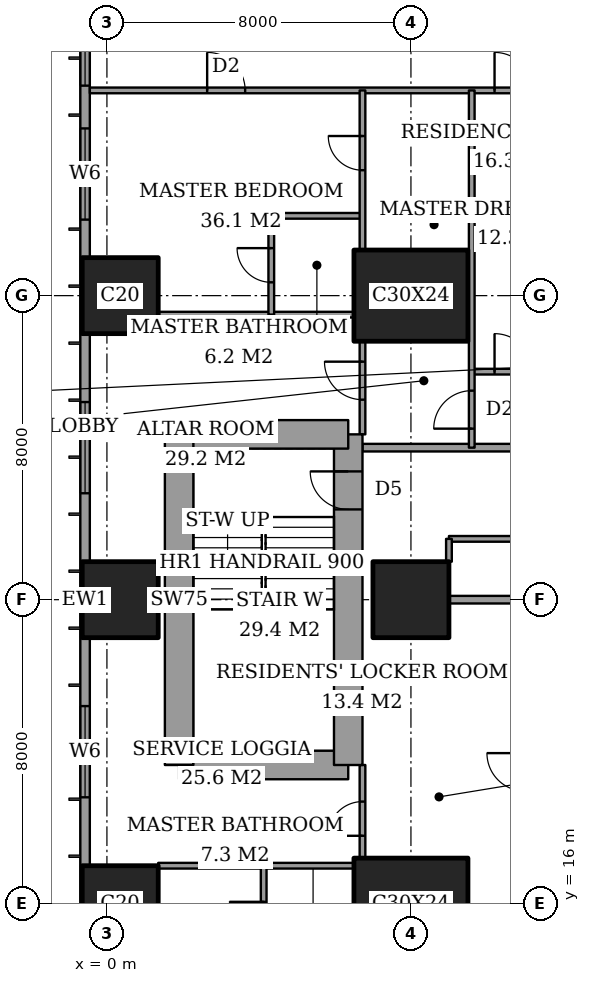
"""IFC4 building model, lengths in metres.
Left out: names, types, materials, properties, quantities, classifications, styles, units other than length and angle.
Written with IfcOpenShell. Run it as: python <this file> out.ifc"""

import sys

from ifc_helpers import new_model, si_unit, direction, frame, frame_2d, origin, origin_2d, place, context, subcontext, project, spatial, rectangle, extrude, element, fill, save


model = new_model("IFC4")
c1 = context("Model", 3, precision=1e-05, world=origin(), true_north=direction((0.0, 1.0)))
c2 = subcontext(c1, "Body", "Model", "MODEL_VIEW")
j1 = project(units=[si_unit("LENGTHUNIT", "METRE"), si_unit("PLANEANGLEUNIT", "RADIAN")], contexts=[c1])
p1 = place(None, origin())
s1 = spatial("IfcSite", under=j1, at=p1, CompositionType="ELEMENT")
p2 = place(p1, origin())
s2 = spatial("IfcBuilding", under=s1, at=p2, CompositionType="ELEMENT")
p3 = place(p2, frame((0.0, 0.0, 72.8)))
s3 = spatial("IfcBuildingStorey", under=s2, at=p3, CompositionType="ELEMENT", Elevation=72.8)
for number, where, z_axis, x_axis in (
    (1, (0.35, 16.0, 0.0), (0.0, 0.0, 1.0), (1.0, 0.0, 0.0)),
    (2, (0.35, 24.0, 0.0), (0.0, 0.0, 1.0), (1.0, 0.0, 0.0)),
    (3, (0.35, 32.0, 0.0), (0.0, 0.0, 1.0), (1.0, 0.0, 0.0)),
):
    element("IfcColumn", number, at=place(p3, frame(where, z_axis=z_axis, x_axis=x_axis)), inside=s3, PredefinedType="COLUMN", context=c2, shape_type="SweptSolid", body=[
        extrude(rectangle(XDim=2.0, YDim=2.0, at=origin_2d()), origin(), (0.0, 0.0, 1.0), 3.6),
    ])
p4 = place(p3, frame((8.0, 16.0, 0.0), z_axis=(0.0, 0.0, 1.0), x_axis=(1.0, 0.0, 0.0)))
e4 = element("IfcColumn", 4, at=p4, inside=s3, PredefinedType="COLUMN", context=c2, shape_type="SweptSolid", body=[
    extrude(rectangle(XDim=3.0, YDim=2.4, at=origin_2d()), origin(), (0.0, 0.0, 1.0), 3.6),
])
p5 = place(p3, frame((8.0, 24.0, 0.0), z_axis=(0.0, 0.0, 1.0), x_axis=(1.0, 0.0, 0.0)))
e5 = element("IfcColumn", 5, at=p5, inside=s3, PredefinedType="COLUMN", context=c2, shape_type="SweptSolid", body=[
    extrude(rectangle(XDim=2.0, YDim=2.0, at=origin_2d()), origin(), (0.0, 0.0, 1.0), 3.6),
])
p6 = place(p3, frame((8.0, 32.0, 0.0), z_axis=(0.0, 0.0, 1.0), x_axis=(1.0, 0.0, 0.0)))
e6 = element("IfcColumn", 6, at=p6, inside=s3, PredefinedType="COLUMN", context=c2, shape_type="SweptSolid", body=[
    extrude(rectangle(XDim=3.0, YDim=2.4, at=origin_2d()), origin(), (0.0, 0.0, 1.0), 3.6),
])
p7 = place(p3, frame((1.9, 19.65, 0.0), z_axis=(0.0, 0.0, 1.0), x_axis=(1.0, 0.0, 0.0)))
e7 = element("IfcWall", 7, at=p7, inside=s3, PredefinedType="SHEAR", context=c2, shape_type="SweptSolid", body=[
    extrude(rectangle(XDim=4.45, YDim=0.75, at=frame_2d((2.225, 0.0))), origin(), (0.0, 0.0, 1.0), 3.6),
])
p8 = place(p3, frame((6.35, 19.65, 0.0), z_axis=(0.0, 0.0, 1.0), x_axis=(0.0, 1.0, 0.0)))
e8 = element("IfcWall", 8, at=p8, inside=s3, PredefinedType="SHEAR", context=c2, shape_type="SweptSolid", body=[
    extrude(rectangle(XDim=8.7, YDim=0.75, at=frame_2d((4.35, 0.0))), origin(), (0.0, 0.0, 1.0), 3.6),
])
p9 = place(p8, frame((6.725, 0.0, 0.0)))
e9 = element("IfcOpeningElement", 9, at=p9, cuts=e8, PredefinedType="OPENING", context=c2, shape_type="SweptSolid", body=[
    extrude(rectangle(XDim=1.0, YDim=2.1, at=frame_2d((0.5, 1.05))), frame((0.0, 0.385, 0.0), z_axis=(0.0, -1.0, 0.0), x_axis=(1.0, 0.0, 0.0)), (0.0, 0.0, 1.0), 0.77),
])
p10 = place(p3, frame((6.35, 28.35, 0.0), z_axis=(0.0, 0.0, 1.0), x_axis=(-1.0, 0.0, 0.0)))
e10 = element("IfcWall", 10, at=p10, inside=s3, PredefinedType="SHEAR", context=c2, shape_type="SweptSolid", body=[
    extrude(rectangle(XDim=4.45, YDim=0.75, at=frame_2d((2.225, 0.0))), origin(), (0.0, 0.0, 1.0), 3.6),
])
p11 = place(p3, frame((1.9, 28.35, 0.0), z_axis=(0.0, 0.0, 1.0), x_axis=(0.0, -1.0, 0.0)))
e11 = element("IfcWall", 11, at=p11, inside=s3, PredefinedType="SHEAR", context=c2, shape_type="SweptSolid", body=[
    extrude(rectangle(XDim=8.7, YDim=0.75, at=frame_2d((4.35, 0.0))), origin(), (0.0, 0.0, 1.0), 3.6),
])
p12 = place(p3, frame((-0.575, 44.825, 0.0), z_axis=(0.0, 0.0, 1.0), x_axis=(0.0, -1.0, 0.0)))
e12 = element("IfcWall", 12, at=p12, inside=s3, PredefinedType="SOLIDWALL", context=c2, shape_type="SweptSolid", body=[
    extrude(rectangle(XDim=41.65, YDim=0.25, at=frame_2d((20.825, 0.0))), origin(), (0.0, 0.0, 1.0), 3.6),
])
p13 = place(p12, frame((0.775, 0.0, 0.6)))
e13 = element("IfcOpeningElement", 13, at=p13, cuts=e12, PredefinedType="OPENING", context=c2, shape_type="SweptSolid", body=[
    extrude(rectangle(XDim=2.4, YDim=2.0, at=frame_2d((1.2, 1.0))), frame((0.0, 0.135, 0.0), z_axis=(0.0, -1.0, 0.0), x_axis=(1.0, 0.0, 0.0)), (0.0, 0.0, 1.0), 0.27),
])
p14 = place(p12, frame((6.1, 0.0, 0.6)))
e14 = element("IfcOpeningElement", 14, at=p14, cuts=e12, PredefinedType="OPENING", context=c2, shape_type="SweptSolid", body=[
    extrude(rectangle(XDim=1.2, YDim=2.0, at=frame_2d((0.6, 1.0))), frame((0.0, 0.135, 0.0), z_axis=(0.0, -1.0, 0.0), x_axis=(1.0, 0.0, 0.0)), (0.0, 0.0, 1.0), 0.27),
])
p15 = place(p12, frame((8.425, 0.0, 0.6)))
e15 = element("IfcOpeningElement", 15, at=p15, cuts=e12, PredefinedType="OPENING", context=c2, shape_type="SweptSolid", body=[
    extrude(rectangle(XDim=2.4, YDim=2.0, at=frame_2d((1.2, 1.0))), frame((0.0, 0.135, 0.0), z_axis=(0.0, -1.0, 0.0), x_axis=(1.0, 0.0, 0.0)), (0.0, 0.0, 1.0), 0.27),
])
p16 = place(p12, frame((15.625, 0.0, 0.6)))
e16 = element("IfcOpeningElement", 16, at=p16, cuts=e12, PredefinedType="OPENING", context=c2, shape_type="SweptSolid", body=[
    extrude(rectangle(XDim=2.4, YDim=2.0, at=frame_2d((1.2, 1.0))), frame((0.0, 0.135, 0.0), z_axis=(0.0, -1.0, 0.0), x_axis=(1.0, 0.0, 0.0)), (0.0, 0.0, 1.0), 0.27),
])
p17 = place(p12, frame((23.625, 0.0, 0.6)))
e17 = element("IfcOpeningElement", 17, at=p17, cuts=e12, PredefinedType="OPENING", context=c2, shape_type="SweptSolid", body=[
    extrude(rectangle(XDim=2.4, YDim=2.0, at=frame_2d((1.2, 1.0))), frame((0.0, 0.135, 0.0), z_axis=(0.0, -1.0, 0.0), x_axis=(1.0, 0.0, 0.0)), (0.0, 0.0, 1.0), 0.27),
])
p18 = place(p12, frame((30.625, 0.0, 0.6)))
e18 = element("IfcOpeningElement", 18, at=p18, cuts=e12, PredefinedType="OPENING", context=c2, shape_type="SweptSolid", body=[
    extrude(rectangle(XDim=2.4, YDim=2.0, at=frame_2d((1.2, 1.0))), frame((0.0, 0.135, 0.0), z_axis=(0.0, -1.0, 0.0), x_axis=(1.0, 0.0, 0.0)), (0.0, 0.0, 1.0), 0.27),
])
p19 = place(p12, frame((34.225, 0.0, 0.6)))
e19 = element("IfcOpeningElement", 19, at=p19, cuts=e12, PredefinedType="OPENING", context=c2, shape_type="SweptSolid", body=[
    extrude(rectangle(XDim=1.2, YDim=2.0, at=frame_2d((0.6, 1.0))), frame((0.0, 0.135, 0.0), z_axis=(0.0, -1.0, 0.0), x_axis=(1.0, 0.0, 0.0)), (0.0, 0.0, 1.0), 0.27),
])
p20 = place(p12, frame((38.475, 0.0, 0.6)))
e20 = element("IfcOpeningElement", 20, at=p20, cuts=e12, PredefinedType="OPENING", context=c2, shape_type="SweptSolid", body=[
    extrude(rectangle(XDim=2.4, YDim=2.0, at=frame_2d((1.2, 1.0))), frame((0.0, 0.135, 0.0), z_axis=(0.0, -1.0, 0.0), x_axis=(1.0, 0.0, 0.0)), (0.0, 0.0, 1.0), 0.27),
])
p21 = place(p3, frame((1.35, 17.0, 0.0), z_axis=(0.0, 0.0, 1.0), x_axis=(1.0, 0.0, 0.0)))
e21 = element("IfcWall", 21, at=p21, inside=s3, PredefinedType="PARTITIONING", context=c2, shape_type="SweptSolid", body=[
    extrude(rectangle(XDim=5.15, YDim=0.15, at=frame_2d((2.575, 0.0))), origin(), (0.0, 0.0, 1.0), 3.35),
])
p22 = place(p3, frame((9.0, 24.0, 0.0), z_axis=(0.0, 0.0, 1.0), x_axis=(1.0, 0.0, 0.0)))
e22 = element("IfcWall", 22, at=p22, inside=s3, PredefinedType="PARTITIONING", context=c2, shape_type="SweptSolid", body=[
    extrude(rectangle(XDim=6.0, YDim=0.2, at=frame_2d((3.0, 0.0))), origin(), (0.0, 0.0, 1.0), 3.35),
])
p23 = place(p3, frame((9.0, 25.6, 0.0), z_axis=(0.0, 0.0, 1.0), x_axis=(1.0, 0.0, 0.0)))
e23 = element("IfcWall", 23, at=p23, inside=s3, PredefinedType="PARTITIONING", context=c2, shape_type="SweptSolid", body=[
    extrude(rectangle(XDim=8.4, YDim=0.15, at=frame_2d((4.2, 0.0))), origin(), (0.0, 0.0, 1.0), 3.35),
])
p24 = place(p23, frame((3.75, 0.0, 0.0)))
e24 = element("IfcOpeningElement", 24, at=p24, cuts=e23, PredefinedType="OPENING", context=c2, shape_type="SweptSolid", body=[
    extrude(rectangle(XDim=0.9, YDim=2.1, at=frame_2d((0.45, 1.05))), frame((0.0, 0.085, 0.0), z_axis=(0.0, -1.0, 0.0), x_axis=(1.0, 0.0, 0.0)), (0.0, 0.0, 1.0), 0.17),
])
p25 = place(p3, frame((6.725, 28.0, 0.0), z_axis=(0.0, 0.0, 1.0), x_axis=(1.0, 0.0, 0.0)))
e25 = element("IfcWall", 25, at=p25, inside=s3, PredefinedType="PARTITIONING", context=c2, shape_type="SweptSolid", body=[
    extrude(rectangle(XDim=17.275, YDim=0.2, at=frame_2d((8.637, 0.0))), origin(), (0.0, 0.0, 1.0), 3.35),
])
p26 = place(p25, frame((6.475, 0.0, 0.0)))
e26 = element("IfcOpeningElement", 26, at=p26, cuts=e25, PredefinedType="OPENING", context=c2, shape_type="SweptSolid", body=[
    extrude(rectangle(XDim=1.2, YDim=2.4, at=frame_2d((0.6, 1.2))), frame((0.0, 0.11, 0.0), z_axis=(0.0, -1.0, 0.0), x_axis=(1.0, 0.0, 0.0)), (0.0, 0.0, 1.0), 0.22),
])
p27 = place(p3, frame((9.6, 30.0, 0.0), z_axis=(0.0, 0.0, 1.0), x_axis=(1.0, 0.0, 0.0)))
e27 = element("IfcWall", 27, at=p27, inside=s3, PredefinedType="PARTITIONING", context=c2, shape_type="SweptSolid", body=[
    extrude(rectangle(XDim=4.8, YDim=0.15, at=frame_2d((2.4, 0.0))), origin(), (0.0, 0.0, 1.0), 3.35),
])
p28 = place(p27, frame((0.6, 0.0, 0.0)))
e28 = element("IfcOpeningElement", 28, at=p28, cuts=e27, PredefinedType="OPENING", context=c2, shape_type="SweptSolid", body=[
    extrude(rectangle(XDim=1.0, YDim=2.1, at=frame_2d((0.5, 1.05))), frame((0.0, 0.085, 0.0), z_axis=(0.0, -1.0, 0.0), x_axis=(1.0, 0.0, 0.0)), (0.0, 0.0, 1.0), 0.17),
])
p29 = place(p3, frame((1.35, 31.5, 0.0), z_axis=(0.0, 0.0, 1.0), x_axis=(1.0, 0.0, 0.0)))
e29 = element("IfcWall", 29, at=p29, inside=s3, PredefinedType="PARTITIONING", context=c2, shape_type="SweptSolid", body=[
    extrude(rectangle(XDim=5.15, YDim=0.15, at=frame_2d((2.575, 0.0))), origin(), (0.0, 0.0, 1.0), 3.35),
])
p30 = place(p3, frame((4.325, 34.1, 0.0), z_axis=(0.0, 0.0, 1.0), x_axis=(1.0, 0.0, 0.0)))
e30 = element("IfcWall", 30, at=p30, inside=s3, PredefinedType="PARTITIONING", context=c2, shape_type="SweptSolid", body=[
    extrude(rectangle(XDim=2.4, YDim=0.15, at=frame_2d((1.2, 0.0))), origin(), (0.0, 0.0, 1.0), 3.35),
])
p31 = place(p3, frame((-0.45, 37.4, 0.0), z_axis=(0.0, 0.0, 1.0), x_axis=(1.0, 0.0, 0.0)))
e31 = element("IfcWall", 31, at=p31, inside=s3, PredefinedType="PARTITIONING", context=c2, shape_type="SweptSolid", body=[
    extrude(rectangle(XDim=25.011, YDim=0.15, at=frame_2d((12.505, 0.0))), origin(), (0.0, 0.0, 1.0), 3.35),
])
p32 = place(p31, frame((10.65, 0.0, 0.0)))
e32 = element("IfcOpeningElement", 32, at=p32, cuts=e31, PredefinedType="OPENING", context=c2, shape_type="SweptSolid", body=[
    extrude(rectangle(XDim=1.0, YDim=2.1, at=frame_2d((0.5, 1.05))), frame((0.0, 0.085, 0.0), z_axis=(0.0, -1.0, 0.0), x_axis=(1.0, 0.0, 0.0)), (0.0, 0.0, 1.0), 0.17),
])
p33 = place(p31, frame((3.087, 0.0, 0.0)))
e33 = element("IfcOpeningElement", 33, at=p33, cuts=e31, PredefinedType="OPENING", context=c2, shape_type="SweptSolid", body=[
    extrude(rectangle(XDim=1.0, YDim=2.1, at=frame_2d((0.5, 1.05))), frame((0.0, 0.085, 0.0), z_axis=(0.0, -1.0, 0.0), x_axis=(1.0, 0.0, 0.0)), (0.0, 0.0, 1.0), 0.17),
])
p34 = place(p31, frame((13.45, 0.0, 0.0)))
e34 = element("IfcOpeningElement", 34, at=p34, cuts=e31, PredefinedType="OPENING", context=c2, shape_type="SweptSolid", body=[
    extrude(rectangle(XDim=1.0, YDim=2.1, at=frame_2d((0.5, 1.05))), frame((0.0, 0.085, 0.0), z_axis=(0.0, -1.0, 0.0), x_axis=(1.0, 0.0, 0.0)), (0.0, 0.0, 1.0), 0.17),
])
p35 = place(p31, frame((16.55, 0.0, 0.0)))
e35 = element("IfcOpeningElement", 35, at=p35, cuts=e31, PredefinedType="OPENING", context=c2, shape_type="SweptSolid", body=[
    extrude(rectangle(XDim=1.0, YDim=2.1, at=frame_2d((0.5, 1.05))), frame((0.0, 0.085, 0.0), z_axis=(0.0, -1.0, 0.0), x_axis=(1.0, 0.0, 0.0)), (0.0, 0.0, 1.0), 0.17),
])
p36 = place(p31, frame((21.175, 0.0, 0.0)))
e36 = element("IfcOpeningElement", 36, at=p36, cuts=e31, PredefinedType="OPENING", context=c2, shape_type="SweptSolid", body=[
    extrude(rectangle(XDim=1.0, YDim=2.1, at=frame_2d((0.5, 1.05))), frame((0.0, 0.085, 0.0), z_axis=(0.0, -1.0, 0.0), x_axis=(1.0, 0.0, 0.0)), (0.0, 0.0, 1.0), 0.17),
])
p37 = place(p3, frame((4.125, 14.2, 0.0), z_axis=(0.0, 0.0, 1.0), x_axis=(0.0, 1.0, 0.0)))
e37 = element("IfcWall", 37, at=p37, inside=s3, PredefinedType="PARTITIONING", context=c2, shape_type="SweptSolid", body=[
    extrude(rectangle(XDim=2.8, YDim=0.15, at=frame_2d((1.4, 0.0))), origin(), (0.0, 0.0, 1.0), 3.35),
])
p38 = place(p37, frame((0.95, 0.0, 0.0)))
e38 = element("IfcOpeningElement", 38, at=p38, cuts=e37, PredefinedType="OPENING", context=c2, shape_type="SweptSolid", body=[
    extrude(rectangle(XDim=0.9, YDim=2.1, at=frame_2d((0.45, 1.05))), frame((0.0, 0.085, 0.0), z_axis=(0.0, -1.0, 0.0), x_axis=(1.0, 0.0, 0.0)), (0.0, 0.0, 1.0), 0.17),
])
p39 = place(p3, frame((4.325, 31.5, 0.0), z_axis=(0.0, 0.0, 1.0), x_axis=(0.0, 1.0, 0.0)))
e39 = element("IfcWall", 39, at=p39, inside=s3, PredefinedType="PARTITIONING", context=c2, shape_type="SweptSolid", body=[
    extrude(rectangle(XDim=2.6, YDim=0.15, at=frame_2d((1.3, 0.0))), origin(), (0.0, 0.0, 1.0), 3.35),
])
p40 = place(p39, frame((0.85, 0.0, 0.0)))
e40 = element("IfcOpeningElement", 40, at=p40, cuts=e39, PredefinedType="OPENING", context=c2, shape_type="SweptSolid", body=[
    extrude(rectangle(XDim=0.9, YDim=2.1, at=frame_2d((0.45, 1.05))), frame((0.0, 0.085, 0.0), z_axis=(0.0, -1.0, 0.0), x_axis=(1.0, 0.0, 0.0)), (0.0, 0.0, 1.0), 0.17),
])
p41 = place(p3, frame((6.725, 17.2, 0.0), z_axis=(0.0, 0.0, 1.0), x_axis=(0.0, 1.0, 0.0)))
e41 = element("IfcWall", 41, at=p41, inside=s3, PredefinedType="PARTITIONING", context=c2, shape_type="SweptSolid", body=[
    extrude(rectangle(XDim=2.45, YDim=0.15, at=frame_2d((1.225, 0.0))), origin(), (0.0, 0.0, 1.0), 3.35),
])
p42 = place(p41, frame((0.587, 0.0, 0.0)))
e42 = element("IfcOpeningElement", 42, at=p42, cuts=e41, PredefinedType="OPENING", context=c2, shape_type="SweptSolid", body=[
    extrude(rectangle(XDim=0.9, YDim=2.1, at=frame_2d((0.45, 1.05))), frame((0.0, 0.085, 0.0), z_axis=(0.0, -1.0, 0.0), x_axis=(1.0, 0.0, 0.0)), (0.0, 0.0, 1.0), 0.17),
])
p43 = place(p3, frame((6.725, 28.35, 0.0), z_axis=(0.0, 0.0, 1.0), x_axis=(0.0, 1.0, 0.0)))
e43 = element("IfcWall", 43, at=p43, inside=s3, PredefinedType="PARTITIONING", context=c2, shape_type="SweptSolid", body=[
    extrude(rectangle(XDim=2.45, YDim=0.15, at=frame_2d((1.225, 0.0))), origin(), (0.0, 0.0, 1.0), 3.35),
])
p44 = place(p43, frame((0.913, 0.0, 0.0)))
e44 = element("IfcOpeningElement", 44, at=p44, cuts=e43, PredefinedType="OPENING", context=c2, shape_type="SweptSolid", body=[
    extrude(rectangle(XDim=1.0, YDim=2.1, at=frame_2d((0.5, 1.05))), frame((0.0, 0.085, 0.0), z_axis=(0.0, -1.0, 0.0), x_axis=(1.0, 0.0, 0.0)), (0.0, 0.0, 1.0), 0.17),
])
p45 = place(p3, frame((6.725, 33.2, 0.0), z_axis=(0.0, 0.0, 1.0), x_axis=(0.0, 1.0, 0.0)))
e45 = element("IfcWall", 45, at=p45, inside=s3, PredefinedType="PARTITIONING", context=c2, shape_type="SweptSolid", body=[
    extrude(rectangle(XDim=4.2, YDim=0.15, at=frame_2d((2.1, 0.0))), origin(), (0.0, 0.0, 1.0), 3.35),
])
p46 = place(p45, frame((2.1, 0.0, 0.0)))
e46 = element("IfcOpeningElement", 46, at=p46, cuts=e45, PredefinedType="OPENING", context=c2, shape_type="SweptSolid", body=[
    extrude(rectangle(XDim=0.9, YDim=2.1, at=frame_2d((0.45, 1.05))), frame((0.0, 0.085, 0.0), z_axis=(0.0, -1.0, 0.0), x_axis=(1.0, 0.0, 0.0)), (0.0, 0.0, 1.0), 0.17),
])
p47 = place(p3, frame((9.0, 25.0, 0.0), z_axis=(0.0, 0.0, 1.0), x_axis=(0.0, 1.0, 0.0)))
e47 = element("IfcWall", 47, at=p47, inside=s3, PredefinedType="PARTITIONING", context=c2, shape_type="SweptSolid", body=[
    extrude(rectangle(XDim=0.6, YDim=0.15, at=frame_2d((0.3, 0.0))), origin(), (0.0, 0.0, 1.0), 3.35),
])
p48 = place(p3, frame((9.6, 28.0, 0.0), z_axis=(0.0, 0.0, 1.0), x_axis=(0.0, 1.0, 0.0)))
e48 = element("IfcWall", 48, at=p48, inside=s3, PredefinedType="PARTITIONING", context=c2, shape_type="SweptSolid", body=[
    extrude(rectangle(XDim=9.4, YDim=0.15, at=frame_2d((4.7, 0.0))), origin(), (0.0, 0.0, 1.0), 3.35),
])
p49 = place(p48, frame((0.5, 0.0, 0.0)))
e49 = element("IfcOpeningElement", 49, at=p49, cuts=e48, PredefinedType="OPENING", context=c2, shape_type="SweptSolid", body=[
    extrude(rectangle(XDim=1.0, YDim=2.1, at=frame_2d((0.5, 1.05))), frame((0.0, 0.085, 0.0), z_axis=(0.0, -1.0, 0.0), x_axis=(1.0, 0.0, 0.0)), (0.0, 0.0, 1.0), 0.17),
])
p50 = place(p14, origin())
e50 = element("IfcWindow", 50, at=p50, inside=s3, PartitioningType="SINGLE_PANEL", PredefinedType="WINDOW", context=c2, shape_type="SweptSolid", body=[
    extrude(rectangle(XDim=1.2, YDim=2.0, at=frame_2d((0.6, 1.0))), frame((0.0, 0.03, 0.0), z_axis=(0.0, -1.0, 0.0), x_axis=(1.0, 0.0, 0.0)), (0.0, 0.0, 1.0), 0.06),
])
fill(e14, e50)
p51 = place(p15, origin())
e51 = element("IfcWindow", 51, at=p51, inside=s3, PartitioningType="SINGLE_PANEL", PredefinedType="WINDOW", context=c2, shape_type="SweptSolid", body=[
    extrude(rectangle(XDim=2.4, YDim=2.0, at=frame_2d((1.2, 1.0))), frame((0.0, 0.03, 0.0), z_axis=(0.0, -1.0, 0.0), x_axis=(1.0, 0.0, 0.0)), (0.0, 0.0, 1.0), 0.06),
])
fill(e15, e51)
p52 = place(p16, origin())
e52 = element("IfcWindow", 52, at=p52, inside=s3, PartitioningType="SINGLE_PANEL", PredefinedType="WINDOW", context=c2, shape_type="SweptSolid", body=[
    extrude(rectangle(XDim=2.4, YDim=2.0, at=frame_2d((1.2, 1.0))), frame((0.0, 0.03, 0.0), z_axis=(0.0, -1.0, 0.0), x_axis=(1.0, 0.0, 0.0)), (0.0, 0.0, 1.0), 0.06),
])
fill(e16, e52)
p53 = place(p17, origin())
e53 = element("IfcWindow", 53, at=p53, inside=s3, PartitioningType="SINGLE_PANEL", PredefinedType="WINDOW", context=c2, shape_type="SweptSolid", body=[
    extrude(rectangle(XDim=2.4, YDim=2.0, at=frame_2d((1.2, 1.0))), frame((0.0, 0.03, 0.0), z_axis=(0.0, -1.0, 0.0), x_axis=(1.0, 0.0, 0.0)), (0.0, 0.0, 1.0), 0.06),
])
fill(e17, e53)
p54 = place(p38, origin())
e54 = element("IfcDoor", 54, at=p54, inside=s3, OperationType="SINGLE_SWING_LEFT", PredefinedType="DOOR", context=c2, shape_type="SweptSolid", body=[
    extrude(rectangle(XDim=0.9, YDim=2.1, at=frame_2d((0.45, 1.05))), frame((0.0, 0.025, 0.0), z_axis=(0.0, -1.0, 0.0), x_axis=(1.0, 0.0, 0.0)), (0.0, 0.0, 1.0), 0.05),
])
fill(e38, e54)
p55 = place(p42, origin())
e55 = element("IfcDoor", 55, at=p55, inside=s3, OperationType="SINGLE_SWING_RIGHT", PredefinedType="DOOR", context=c2, shape_type="SweptSolid", body=[
    extrude(rectangle(XDim=0.9, YDim=2.1, at=frame_2d((0.45, 1.05))), frame((0.0, 0.025, 0.0), z_axis=(0.0, -1.0, 0.0), x_axis=(1.0, 0.0, 0.0)), (0.0, 0.0, 1.0), 0.05),
])
fill(e42, e55)
p56 = place(p32, origin())
e56 = element("IfcDoor", 56, at=p56, inside=s3, OperationType="SINGLE_SWING_RIGHT", PredefinedType="DOOR", context=c2, shape_type="SweptSolid", body=[
    extrude(rectangle(XDim=1.0, YDim=2.1, at=frame_2d((0.5, 1.05))), frame((0.0, 0.025, 0.0), z_axis=(0.0, -1.0, 0.0), x_axis=(1.0, 0.0, 0.0)), (0.0, 0.0, 1.0), 0.05),
])
fill(e32, e56)
p57 = place(p40, origin())
e57 = element("IfcDoor", 57, at=p57, inside=s3, OperationType="SINGLE_SWING_LEFT", PredefinedType="DOOR", context=c2, shape_type="SweptSolid", body=[
    extrude(rectangle(XDim=0.9, YDim=2.1, at=frame_2d((0.45, 1.05))), frame((0.0, 0.025, 0.0), z_axis=(0.0, -1.0, 0.0), x_axis=(1.0, 0.0, 0.0)), (0.0, 0.0, 1.0), 0.05),
])
fill(e40, e57)
p58 = place(p33, origin())
e58 = element("IfcDoor", 58, at=p58, inside=s3, OperationType="SINGLE_SWING_RIGHT", PredefinedType="DOOR", context=c2, shape_type="SweptSolid", body=[
    extrude(rectangle(XDim=1.0, YDim=2.1, at=frame_2d((0.5, 1.05))), frame((0.0, 0.025, 0.0), z_axis=(0.0, -1.0, 0.0), x_axis=(1.0, 0.0, 0.0)), (0.0, 0.0, 1.0), 0.05),
])
fill(e33, e58)
p59 = place(p44, origin())
e59 = element("IfcDoor", 59, at=p59, inside=s3, OperationType="SINGLE_SWING_LEFT", PredefinedType="DOOR", context=c2, shape_type="SweptSolid", body=[
    extrude(rectangle(XDim=1.0, YDim=2.1, at=frame_2d((0.5, 1.05))), frame((0.0, 0.025, 0.0), z_axis=(0.0, -1.0, 0.0), x_axis=(1.0, 0.0, 0.0)), (0.0, 0.0, 1.0), 0.05),
])
fill(e44, e59)
p60 = place(p46, origin())
e60 = element("IfcDoor", 60, at=p60, inside=s3, OperationType="SINGLE_SWING_LEFT", PredefinedType="DOOR", context=c2, shape_type="SweptSolid", body=[
    extrude(rectangle(XDim=0.9, YDim=2.1, at=frame_2d((0.45, 1.05))), frame((0.0, 0.025, 0.0), z_axis=(0.0, -1.0, 0.0), x_axis=(1.0, 0.0, 0.0)), (0.0, 0.0, 1.0), 0.05),
])
fill(e46, e60)
p61 = place(p49, origin())
e61 = element("IfcDoor", 61, at=p61, inside=s3, OperationType="SINGLE_SWING_RIGHT", PredefinedType="DOOR", context=c2, shape_type="SweptSolid", body=[
    extrude(rectangle(XDim=1.0, YDim=2.1, at=frame_2d((0.5, 1.05))), frame((0.0, 0.025, 0.0), z_axis=(0.0, -1.0, 0.0), x_axis=(1.0, 0.0, 0.0)), (0.0, 0.0, 1.0), 0.05),
])
fill(e49, e61)
p62 = place(p28, origin())
e62 = element("IfcDoor", 62, at=p62, inside=s3, OperationType="SINGLE_SWING_RIGHT", PredefinedType="DOOR", context=c2, shape_type="SweptSolid", body=[
    extrude(rectangle(XDim=1.0, YDim=2.1, at=frame_2d((0.5, 1.05))), frame((0.0, 0.025, 0.0), z_axis=(0.0, -1.0, 0.0), x_axis=(1.0, 0.0, 0.0)), (0.0, 0.0, 1.0), 0.05),
])
fill(e28, e62)
p63 = place(p9, origin())
e63 = element("IfcDoor", 63, at=p63, inside=s3, OperationType="SINGLE_SWING_LEFT", PredefinedType="DOOR", context=c2, shape_type="SweptSolid", body=[
    extrude(rectangle(XDim=1.0, YDim=2.1, at=frame_2d((0.5, 1.05))), frame((0.0, 0.025, 0.0), z_axis=(0.0, -1.0, 0.0), x_axis=(1.0, 0.0, 0.0)), (0.0, 0.0, 1.0), 0.05),
])
fill(e9, e63)
save(model, sys.argv[1])
